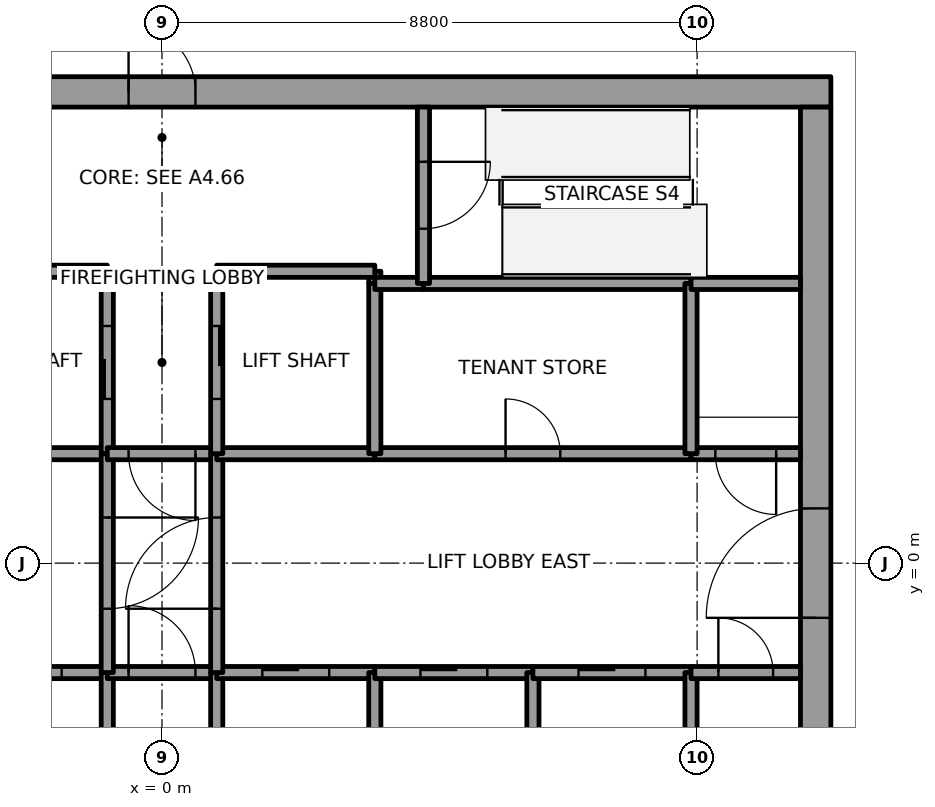
"""IFC4 building model, lengths in metres.
Left out: names, types, materials, properties, quantities, classifications, styles, units other than length and angle.
Written with IfcOpenShell. Run it as: python <this file> out.ifc"""

import sys

from ifc_helpers import new_model, si_unit, direction, frame, frame_2d, origin, place, context, subcontext, project, spatial, rectangle, extrude, element, fill, save


model = new_model("IFC4")
c1 = context("Model", 3, precision=1e-05, world=origin(), true_north=direction((0.0, 1.0)))
c2 = subcontext(c1, "Body", "Model", "MODEL_VIEW")
j1 = project(units=[si_unit("LENGTHUNIT", "METRE"), si_unit("PLANEANGLEUNIT", "RADIAN")], contexts=[c1])
p1 = place(None, origin())
s1 = spatial("IfcSite", under=j1, at=p1, CompositionType="ELEMENT")
p2 = place(p1, origin())
s2 = spatial("IfcBuilding", under=s1, at=p2, CompositionType="ELEMENT")
p3 = place(p2, frame((0.0, 0.0, 283.0)))
s3 = spatial("IfcBuildingStorey", under=s2, at=p3, CompositionType="ELEMENT", Elevation=283.0)
p4 = place(p3, frame((-11.0, 7.75, 0.0), z_axis=(0.0, 0.0, 1.0), x_axis=(1.0, 0.0, 0.0)))
e1 = element("IfcWall", 1, at=p4, inside=s3, PredefinedType="SHEAR", context=c2, shape_type="SweptSolid", body=[
    extrude(rectangle(XDim=22.0, YDim=0.5, at=frame_2d((11.0, 0.0))), origin(), (0.0, 0.0, 1.0), 4.0),
])
p5 = place(p4, frame((10.45, 0.0, 0.0)))
e2 = element("IfcOpeningElement", 2, at=p5, cuts=e1, PredefinedType="OPENING", context=c2, shape_type="SweptSolid", body=[
    extrude(rectangle(XDim=1.1, YDim=2.1, at=frame_2d((0.55, 1.05))), frame((0.0, 0.25, 0.0), z_axis=(0.0, -1.0, 0.0), x_axis=(1.0, 0.0, 0.0)), (0.0, 0.0, 1.0), 0.5),
])
p6 = place(p3, frame((10.75, -7.5, 0.0), z_axis=(0.0, 0.0, 1.0), x_axis=(0.0, 1.0, 0.0)))
e3 = element("IfcWall", 3, at=p6, inside=s3, PredefinedType="SHEAR", context=c2, shape_type="SweptSolid", body=[
    extrude(rectangle(XDim=15.0, YDim=0.5, at=frame_2d((7.5, 0.0))), origin(), (0.0, 0.0, 1.0), 4.0),
])
p7 = place(p6, frame((6.6, 0.0, 0.0)))
e4 = element("IfcOpeningElement", 4, at=p7, cuts=e3, PredefinedType="OPENING", context=c2, shape_type="SweptSolid", body=[
    extrude(rectangle(XDim=1.8, YDim=2.1, at=frame_2d((0.9, 1.05))), frame((0.0, 0.25, 0.0), z_axis=(0.0, -1.0, 0.0), x_axis=(1.0, 0.0, 0.0)), (0.0, 0.0, 1.0), 0.5),
])
p8 = place(p3, frame((-3.5, -1.8, 0.0), z_axis=(0.0, 0.0, 1.0), x_axis=(1.0, 0.0, 0.0)))
e5 = element("IfcWall", 5, at=p8, inside=s3, PredefinedType="SOLIDWALL", context=c2, shape_type="SweptSolid", body=[
    extrude(rectangle(XDim=2.6, YDim=0.2, at=frame_2d((1.3, 0.0))), origin(), (0.0, 0.0, 1.0), 3.85),
])
p9 = place(p8, frame((0.75, 0.0, 0.0)))
e6 = element("IfcOpeningElement", 6, at=p9, cuts=e5, PredefinedType="OPENING", context=c2, shape_type="SweptSolid", body=[
    extrude(rectangle(XDim=1.1, YDim=2.1, at=frame_2d((0.55, 1.05))), frame((0.0, 0.1, 0.0), z_axis=(0.0, -1.0, 0.0), x_axis=(1.0, 0.0, 0.0)), (0.0, 0.0, 1.0), 0.2),
])
p10 = place(p3, frame((-0.9, 1.8, 0.0), z_axis=(0.0, 0.0, 1.0), x_axis=(-1.0, 0.0, 0.0)))
e7 = element("IfcWall", 7, at=p10, inside=s3, PredefinedType="SOLIDWALL", context=c2, shape_type="SweptSolid", body=[
    extrude(rectangle(XDim=2.6, YDim=0.2, at=frame_2d((1.3, 0.0))), origin(), (0.0, 0.0, 1.0), 3.85),
])
p11 = place(p3, frame((-0.9, 1.8, 0.0), z_axis=(0.0, 0.0, 1.0), x_axis=(0.0, 1.0, 0.0)))
e8 = element("IfcWall", 8, at=p11, inside=s3, PredefinedType="SOLIDWALL", context=c2, shape_type="SweptSolid", body=[
    extrude(rectangle(XDim=3.0, YDim=0.2, at=frame_2d((1.5, 0.0))), origin(), (0.0, 0.0, 1.0), 3.85),
])
p12 = place(p11, frame((0.9, 0.0, 0.0)))
e9 = element("IfcOpeningElement", 9, at=p12, cuts=e8, PredefinedType="OPENING", context=c2, shape_type="SweptSolid", body=[
    extrude(rectangle(XDim=1.2, YDim=2.1, at=frame_2d((0.6, 1.05))), frame((0.0, 0.1, 0.0), z_axis=(0.0, -1.0, 0.0), x_axis=(1.0, 0.0, 0.0)), (0.0, 0.0, 1.0), 0.2),
])
p13 = place(p3, frame((-0.9, 4.8, 0.0), z_axis=(0.0, 0.0, 1.0), x_axis=(-1.0, 0.0, 0.0)))
e10 = element("IfcWall", 10, at=p13, inside=s3, PredefinedType="SOLIDWALL", context=c2, shape_type="SweptSolid", body=[
    extrude(rectangle(XDim=2.6, YDim=0.2, at=frame_2d((1.3, 0.0))), origin(), (0.0, 0.0, 1.0), 3.85),
])
p14 = place(p3, frame((-0.9, -4.6, 0.0), z_axis=(0.0, 0.0, 1.0), x_axis=(0.0, 1.0, 0.0)))
e11 = element("IfcWall", 11, at=p14, inside=s3, PredefinedType="SOLIDWALL", context=c2, shape_type="SweptSolid", body=[
    extrude(rectangle(XDim=2.8, YDim=0.2, at=frame_2d((1.4, 0.0))), origin(), (0.0, 0.0, 1.0), 3.85),
])
p15 = place(p3, frame((-0.9, -1.8, 0.0), z_axis=(0.0, 0.0, 1.0), x_axis=(1.0, 0.0, 0.0)))
e12 = element("IfcWall", 12, at=p15, inside=s3, PredefinedType="SOLIDWALL", context=c2, shape_type="SweptSolid", body=[
    extrude(rectangle(XDim=1.8, YDim=0.2, at=frame_2d((0.9, 0.0))), origin(), (0.0, 0.0, 1.0), 3.85),
])
p16 = place(p15, frame((0.35, 0.0, 0.0)))
e13 = element("IfcOpeningElement", 13, at=p16, cuts=e12, PredefinedType="OPENING", context=c2, shape_type="SweptSolid", body=[
    extrude(rectangle(XDim=1.1, YDim=2.1, at=frame_2d((0.55, 1.05))), frame((0.0, 0.1, 0.0), z_axis=(0.0, -1.0, 0.0), x_axis=(1.0, 0.0, 0.0)), (0.0, 0.0, 1.0), 0.2),
])
p17 = place(p3, frame((-0.9, 1.8, 0.0), z_axis=(0.0, 0.0, 1.0), x_axis=(0.0, -1.0, 0.0)))
e14 = element("IfcWall", 14, at=p17, inside=s3, PredefinedType="SOLIDWALL", context=c2, shape_type="SweptSolid", body=[
    extrude(rectangle(XDim=3.6, YDim=0.2, at=frame_2d((1.8, 0.0))), origin(), (0.0, 0.0, 1.0), 3.85),
])
p18 = place(p17, frame((1.05, 0.0, 0.0)))
e15 = element("IfcOpeningElement", 15, at=p18, cuts=e14, PredefinedType="OPENING", context=c2, shape_type="SweptSolid", body=[
    extrude(rectangle(XDim=1.5, YDim=2.1, at=frame_2d((0.75, 1.05))), frame((0.0, 0.1, 0.0), z_axis=(0.0, -1.0, 0.0), x_axis=(1.0, 0.0, 0.0)), (0.0, 0.0, 1.0), 0.2),
])
p19 = place(p3, frame((0.9, 1.8, 0.0), z_axis=(0.0, 0.0, 1.0), x_axis=(-1.0, 0.0, 0.0)))
e16 = element("IfcWall", 16, at=p19, inside=s3, PredefinedType="SOLIDWALL", context=c2, shape_type="SweptSolid", body=[
    extrude(rectangle(XDim=1.8, YDim=0.2, at=frame_2d((0.9, 0.0))), origin(), (0.0, 0.0, 1.0), 3.85),
])
p20 = place(p19, frame((0.35, 0.0, 0.0)))
e17 = element("IfcOpeningElement", 17, at=p20, cuts=e16, PredefinedType="OPENING", context=c2, shape_type="SweptSolid", body=[
    extrude(rectangle(XDim=1.1, YDim=2.1, at=frame_2d((0.55, 1.05))), frame((0.0, 0.1, 0.0), z_axis=(0.0, -1.0, 0.0), x_axis=(1.0, 0.0, 0.0)), (0.0, 0.0, 1.0), 0.2),
])
p21 = place(p3, frame((0.9, -1.8, 0.0), z_axis=(0.0, 0.0, 1.0), x_axis=(0.0, -1.0, 0.0)))
e18 = element("IfcWall", 18, at=p21, inside=s3, PredefinedType="SOLIDWALL", context=c2, shape_type="SweptSolid", body=[
    extrude(rectangle(XDim=2.8, YDim=0.2, at=frame_2d((1.4, 0.0))), origin(), (0.0, 0.0, 1.0), 3.85),
])
p22 = place(p3, frame((0.9, -1.8, 0.0), z_axis=(0.0, 0.0, 1.0), x_axis=(1.0, 0.0, 0.0)))
e19 = element("IfcWall", 19, at=p22, inside=s3, PredefinedType="SOLIDWALL", context=c2, shape_type="SweptSolid", body=[
    extrude(rectangle(XDim=2.6, YDim=0.2, at=frame_2d((1.3, 0.0))), origin(), (0.0, 0.0, 1.0), 3.85),
])
p23 = place(p22, frame((0.75, 0.0, 0.0)))
e20 = element("IfcOpeningElement", 20, at=p23, cuts=e19, PredefinedType="OPENING", context=c2, shape_type="SweptSolid", body=[
    extrude(rectangle(XDim=1.1, YDim=2.1, at=frame_2d((0.55, 1.05))), frame((0.0, 0.1, 0.0), z_axis=(0.0, -1.0, 0.0), x_axis=(1.0, 0.0, 0.0)), (0.0, 0.0, 1.0), 0.2),
])
p24 = place(p3, frame((0.9, -1.8, 0.0), z_axis=(0.0, 0.0, 1.0), x_axis=(0.0, 1.0, 0.0)))
e21 = element("IfcWall", 21, at=p24, inside=s3, PredefinedType="SOLIDWALL", context=c2, shape_type="SweptSolid", body=[
    extrude(rectangle(XDim=3.6, YDim=0.2, at=frame_2d((1.8, 0.0))), origin(), (0.0, 0.0, 1.0), 3.85),
])
p25 = place(p24, frame((1.05, 0.0, 0.0)))
e22 = element("IfcOpeningElement", 22, at=p25, cuts=e21, PredefinedType="OPENING", context=c2, shape_type="SweptSolid", body=[
    extrude(rectangle(XDim=1.5, YDim=2.1, at=frame_2d((0.75, 1.05))), frame((0.0, 0.1, 0.0), z_axis=(0.0, -1.0, 0.0), x_axis=(1.0, 0.0, 0.0)), (0.0, 0.0, 1.0), 0.2),
])
p26 = place(p3, frame((3.5, 1.8, 0.0), z_axis=(0.0, 0.0, 1.0), x_axis=(-1.0, 0.0, 0.0)))
e23 = element("IfcWall", 23, at=p26, inside=s3, PredefinedType="SOLIDWALL", context=c2, shape_type="SweptSolid", body=[
    extrude(rectangle(XDim=2.6, YDim=0.2, at=frame_2d((1.3, 0.0))), origin(), (0.0, 0.0, 1.0), 3.85),
])
p27 = place(p3, frame((3.5, 4.6, 0.0), z_axis=(0.0, 0.0, 1.0), x_axis=(0.0, 1.0, 0.0)))
e24 = element("IfcWall", 24, at=p27, inside=s3, PredefinedType="SOLIDWALL", context=c2, shape_type="SweptSolid", body=[
    extrude(rectangle(XDim=0.2, YDim=0.2, at=frame_2d((0.1, 0.0))), origin(), (0.0, 0.0, 1.0), 3.85),
])
p28 = place(p3, frame((3.5, 4.8, 0.0), z_axis=(0.0, 0.0, 1.0), x_axis=(-1.0, 0.0, 0.0)))
e25 = element("IfcWall", 25, at=p28, inside=s3, PredefinedType="SOLIDWALL", context=c2, shape_type="SweptSolid", body=[
    extrude(rectangle(XDim=2.6, YDim=0.2, at=frame_2d((1.3, 0.0))), origin(), (0.0, 0.0, 1.0), 3.85),
])
p29 = place(p3, frame((0.9, 4.8, 0.0), z_axis=(0.0, 0.0, 1.0), x_axis=(0.0, -1.0, 0.0)))
e26 = element("IfcWall", 26, at=p29, inside=s3, PredefinedType="SOLIDWALL", context=c2, shape_type="SweptSolid", body=[
    extrude(rectangle(XDim=3.0, YDim=0.2, at=frame_2d((1.5, 0.0))), origin(), (0.0, 0.0, 1.0), 3.85),
])
p30 = place(p29, frame((0.9, 0.0, 0.0)))
e27 = element("IfcOpeningElement", 27, at=p30, cuts=e26, PredefinedType="OPENING", context=c2, shape_type="SweptSolid", body=[
    extrude(rectangle(XDim=1.2, YDim=2.1, at=frame_2d((0.6, 1.05))), frame((0.0, 0.1, 0.0), z_axis=(0.0, -1.0, 0.0), x_axis=(1.0, 0.0, 0.0)), (0.0, 0.0, 1.0), 0.2),
])
p31 = place(p3, frame((3.5, -4.6, 0.0), z_axis=(0.0, 0.0, 1.0), x_axis=(0.0, 1.0, 0.0)))
e28 = element("IfcWall", 28, at=p31, inside=s3, PredefinedType="SOLIDWALL", context=c2, shape_type="SweptSolid", body=[
    extrude(rectangle(XDim=2.8, YDim=0.2, at=frame_2d((1.4, 0.0))), origin(), (0.0, 0.0, 1.0), 3.85),
])
p32 = place(p3, frame((3.5, -1.8, 0.0), z_axis=(0.0, 0.0, 1.0), x_axis=(1.0, 0.0, 0.0)))
e29 = element("IfcWall", 29, at=p32, inside=s3, PredefinedType="SOLIDWALL", context=c2, shape_type="SweptSolid", body=[
    extrude(rectangle(XDim=2.6, YDim=0.2, at=frame_2d((1.3, 0.0))), origin(), (0.0, 0.0, 1.0), 3.85),
])
p33 = place(p32, frame((0.75, 0.0, 0.0)))
e30 = element("IfcOpeningElement", 30, at=p33, cuts=e29, PredefinedType="OPENING", context=c2, shape_type="SweptSolid", body=[
    extrude(rectangle(XDim=1.1, YDim=2.1, at=frame_2d((0.55, 1.05))), frame((0.0, 0.1, 0.0), z_axis=(0.0, -1.0, 0.0), x_axis=(1.0, 0.0, 0.0)), (0.0, 0.0, 1.0), 0.2),
])
p34 = place(p3, frame((3.5, 1.8, 0.0), z_axis=(0.0, 0.0, 1.0), x_axis=(1.0, 0.0, 0.0)))
e31 = element("IfcWall", 31, at=p34, inside=s3, PredefinedType="SOLIDWALL", context=c2, shape_type="SweptSolid", body=[
    extrude(rectangle(XDim=5.2, YDim=0.2, at=frame_2d((2.6, 0.0))), origin(), (0.0, 0.0, 1.0), 3.85),
])
p35 = place(p34, frame((2.15, 0.0, 0.0)))
e32 = element("IfcOpeningElement", 32, at=p35, cuts=e31, PredefinedType="OPENING", context=c2, shape_type="SweptSolid", body=[
    extrude(rectangle(XDim=0.9, YDim=2.1, at=frame_2d((0.45, 1.05))), frame((0.0, 0.1, 0.0), z_axis=(0.0, -1.0, 0.0), x_axis=(1.0, 0.0, 0.0)), (0.0, 0.0, 1.0), 0.2),
])
p36 = place(p3, frame((3.5, 4.6, 0.0), z_axis=(0.0, 0.0, 1.0), x_axis=(0.0, -1.0, 0.0)))
e33 = element("IfcWall", 33, at=p36, inside=s3, PredefinedType="SOLIDWALL", context=c2, shape_type="SweptSolid", body=[
    extrude(rectangle(XDim=2.8, YDim=0.2, at=frame_2d((1.4, 0.0))), origin(), (0.0, 0.0, 1.0), 3.85),
])
p37 = place(p3, frame((4.3, 4.6, 0.0), z_axis=(0.0, 0.0, 1.0), x_axis=(-1.0, 0.0, 0.0)))
e34 = element("IfcWall", 34, at=p37, inside=s3, PredefinedType="SOLIDWALL", context=c2, shape_type="SweptSolid", body=[
    extrude(rectangle(XDim=0.8, YDim=0.2, at=frame_2d((0.4, 0.0))), origin(), (0.0, 0.0, 1.0), 3.85),
])
p38 = place(p3, frame((8.7, 4.6, 0.0), z_axis=(0.0, 0.0, 1.0), x_axis=(-1.0, 0.0, 0.0)))
e35 = element("IfcWall", 35, at=p38, inside=s3, PredefinedType="SOLIDWALL", context=c2, shape_type="SweptSolid", body=[
    extrude(rectangle(XDim=4.4, YDim=0.2, at=frame_2d((2.2, 0.0))), origin(), (0.0, 0.0, 1.0), 3.85),
])
p39 = place(p3, frame((4.3, 7.5, 0.0), z_axis=(0.0, 0.0, 1.0), x_axis=(0.0, -1.0, 0.0)))
e36 = element("IfcWall", 36, at=p39, inside=s3, PredefinedType="SOLIDWALL", context=c2, shape_type="SweptSolid", body=[
    extrude(rectangle(XDim=2.9, YDim=0.2, at=frame_2d((1.45, 0.0))), origin(), (0.0, 0.0, 1.0), 3.85),
])
p40 = place(p39, frame((0.9, 0.0, 0.0)))
e37 = element("IfcOpeningElement", 37, at=p40, cuts=e36, PredefinedType="OPENING", context=c2, shape_type="SweptSolid", body=[
    extrude(rectangle(XDim=1.1, YDim=2.1, at=frame_2d((0.55, 1.05))), frame((0.0, 0.1, 0.0), z_axis=(0.0, -1.0, 0.0), x_axis=(1.0, 0.0, 0.0)), (0.0, 0.0, 1.0), 0.2),
])
p41 = place(p3, frame((6.1, -4.6, 0.0), z_axis=(0.0, 0.0, 1.0), x_axis=(0.0, 1.0, 0.0)))
e38 = element("IfcWall", 38, at=p41, inside=s3, PredefinedType="SOLIDWALL", context=c2, shape_type="SweptSolid", body=[
    extrude(rectangle(XDim=2.8, YDim=0.2, at=frame_2d((1.4, 0.0))), origin(), (0.0, 0.0, 1.0), 3.85),
])
p42 = place(p3, frame((6.1, -1.8, 0.0), z_axis=(0.0, 0.0, 1.0), x_axis=(1.0, 0.0, 0.0)))
e39 = element("IfcWall", 39, at=p42, inside=s3, PredefinedType="SOLIDWALL", context=c2, shape_type="SweptSolid", body=[
    extrude(rectangle(XDim=2.6, YDim=0.2, at=frame_2d((1.3, 0.0))), origin(), (0.0, 0.0, 1.0), 3.85),
])
p43 = place(p42, frame((0.75, 0.0, 0.0)))
e40 = element("IfcOpeningElement", 40, at=p43, cuts=e39, PredefinedType="OPENING", context=c2, shape_type="SweptSolid", body=[
    extrude(rectangle(XDim=1.1, YDim=2.1, at=frame_2d((0.55, 1.05))), frame((0.0, 0.1, 0.0), z_axis=(0.0, -1.0, 0.0), x_axis=(1.0, 0.0, 0.0)), (0.0, 0.0, 1.0), 0.2),
])
p44 = place(p3, frame((8.7, -1.8, 0.0), z_axis=(0.0, 0.0, 1.0), x_axis=(0.0, -1.0, 0.0)))
e41 = element("IfcWall", 41, at=p44, inside=s3, PredefinedType="SOLIDWALL", context=c2, shape_type="SweptSolid", body=[
    extrude(rectangle(XDim=2.8, YDim=0.2, at=frame_2d((1.4, 0.0))), origin(), (0.0, 0.0, 1.0), 3.85),
])
p45 = place(p3, frame((8.7, -1.8, 0.0), z_axis=(0.0, 0.0, 1.0), x_axis=(1.0, 0.0, 0.0)))
e42 = element("IfcWall", 42, at=p45, inside=s3, PredefinedType="SOLIDWALL", context=c2, shape_type="SweptSolid", body=[
    extrude(rectangle(XDim=1.8, YDim=0.2, at=frame_2d((0.9, 0.0))), origin(), (0.0, 0.0, 1.0), 3.85),
])
p46 = place(p45, frame((0.45, 0.0, 0.0)))
e43 = element("IfcOpeningElement", 43, at=p46, cuts=e42, PredefinedType="OPENING", context=c2, shape_type="SweptSolid", body=[
    extrude(rectangle(XDim=0.9, YDim=2.1, at=frame_2d((0.45, 1.05))), frame((0.0, 0.1, 0.0), z_axis=(0.0, -1.0, 0.0), x_axis=(1.0, 0.0, 0.0)), (0.0, 0.0, 1.0), 0.2),
])
p47 = place(p3, frame((10.5, 1.8, 0.0), z_axis=(0.0, 0.0, 1.0), x_axis=(-1.0, 0.0, 0.0)))
e44 = element("IfcWall", 44, at=p47, inside=s3, PredefinedType="SOLIDWALL", context=c2, shape_type="SweptSolid", body=[
    extrude(rectangle(XDim=1.8, YDim=0.2, at=frame_2d((0.9, 0.0))), origin(), (0.0, 0.0, 1.0), 3.85),
])
p48 = place(p47, frame((0.4, 0.0, 0.0)))
e45 = element("IfcOpeningElement", 45, at=p48, cuts=e44, PredefinedType="OPENING", context=c2, shape_type="SweptSolid", body=[
    extrude(rectangle(XDim=1.0, YDim=2.1, at=frame_2d((0.5, 1.05))), frame((0.0, 0.1, 0.0), z_axis=(0.0, -1.0, 0.0), x_axis=(1.0, 0.0, 0.0)), (0.0, 0.0, 1.0), 0.2),
])
p49 = place(p3, frame((8.7, 1.8, 0.0), z_axis=(0.0, 0.0, 1.0), x_axis=(0.0, 1.0, 0.0)))
e46 = element("IfcWall", 46, at=p49, inside=s3, PredefinedType="SOLIDWALL", context=c2, shape_type="SweptSolid", body=[
    extrude(rectangle(XDim=2.8, YDim=0.2, at=frame_2d((1.4, 0.0))), origin(), (0.0, 0.0, 1.0), 3.85),
])
p50 = place(p3, frame((10.5, 4.6, 0.0), z_axis=(0.0, 0.0, 1.0), x_axis=(-1.0, 0.0, 0.0)))
e47 = element("IfcWall", 47, at=p50, inside=s3, PredefinedType="SOLIDWALL", context=c2, shape_type="SweptSolid", body=[
    extrude(rectangle(XDim=1.8, YDim=0.2, at=frame_2d((0.9, 0.0))), origin(), (0.0, 0.0, 1.0), 3.85),
])
p51 = place(p9, origin())
e48 = element("IfcDoor", 48, at=p51, inside=s3, OperationType="SLIDING_TO_LEFT", PredefinedType="DOOR", context=c2, shape_type="SweptSolid", body=[
    extrude(rectangle(XDim=1.1, YDim=2.1, at=frame_2d((0.55, 1.05))), frame((0.0, 0.025, 0.0), z_axis=(0.0, -1.0, 0.0), x_axis=(1.0, 0.0, 0.0)), (0.0, 0.0, 1.0), 0.05),
])
fill(e6, e48)
p52 = place(p23, origin())
e49 = element("IfcDoor", 49, at=p52, inside=s3, OperationType="SLIDING_TO_LEFT", PredefinedType="DOOR", context=c2, shape_type="SweptSolid", body=[
    extrude(rectangle(XDim=1.1, YDim=2.1, at=frame_2d((0.55, 1.05))), frame((0.0, 0.025, 0.0), z_axis=(0.0, -1.0, 0.0), x_axis=(1.0, 0.0, 0.0)), (0.0, 0.0, 1.0), 0.05),
])
fill(e20, e49)
p53 = place(p33, origin())
e50 = element("IfcDoor", 50, at=p53, inside=s3, OperationType="SLIDING_TO_RIGHT", PredefinedType="DOOR", context=c2, shape_type="SweptSolid", body=[
    extrude(rectangle(XDim=1.1, YDim=2.1, at=frame_2d((0.55, 1.05))), frame((0.0, 0.025, 0.0), z_axis=(0.0, -1.0, 0.0), x_axis=(1.0, 0.0, 0.0)), (0.0, 0.0, 1.0), 0.05),
])
fill(e30, e50)
p54 = place(p43, origin())
e51 = element("IfcDoor", 51, at=p54, inside=s3, OperationType="SLIDING_TO_RIGHT", PredefinedType="DOOR", context=c2, shape_type="SweptSolid", body=[
    extrude(rectangle(XDim=1.1, YDim=2.1, at=frame_2d((0.55, 1.05))), frame((0.0, 0.025, 0.0), z_axis=(0.0, -1.0, 0.0), x_axis=(1.0, 0.0, 0.0)), (0.0, 0.0, 1.0), 0.05),
])
fill(e40, e51)
p55 = place(p12, origin())
e52 = element("IfcDoor", 52, at=p55, inside=s3, OperationType="SLIDING_TO_LEFT", PredefinedType="DOOR", context=c2, shape_type="SweptSolid", body=[
    extrude(rectangle(XDim=1.2, YDim=2.1, at=frame_2d((0.6, 1.05))), frame((0.0, 0.025, 0.0), z_axis=(0.0, -1.0, 0.0), x_axis=(1.0, 0.0, 0.0)), (0.0, 0.0, 1.0), 0.05),
])
fill(e9, e52)
p56 = place(p30, origin())
e53 = element("IfcDoor", 53, at=p56, inside=s3, OperationType="SLIDING_TO_RIGHT", PredefinedType="DOOR", context=c2, shape_type="SweptSolid", body=[
    extrude(rectangle(XDim=1.2, YDim=2.1, at=frame_2d((0.6, 1.05))), frame((0.0, 0.025, 0.0), z_axis=(0.0, -1.0, 0.0), x_axis=(1.0, 0.0, 0.0)), (0.0, 0.0, 1.0), 0.05),
])
fill(e27, e53)
p57 = place(p18, origin())
e54 = element("IfcDoor", 54, at=p57, inside=s3, OperationType="DOUBLE_DOOR_SINGLE_SWING", PredefinedType="DOOR", context=c2, shape_type="SweptSolid", body=[
    extrude(rectangle(XDim=1.5, YDim=2.1, at=frame_2d((0.75, 1.05))), frame((0.0, 0.025, 0.0), z_axis=(0.0, -1.0, 0.0), x_axis=(1.0, 0.0, 0.0)), (0.0, 0.0, 1.0), 0.05),
])
fill(e15, e54)
p58 = place(p25, origin())
e55 = element("IfcDoor", 55, at=p58, inside=s3, OperationType="DOUBLE_DOOR_SINGLE_SWING", PredefinedType="DOOR", context=c2, shape_type="SweptSolid", body=[
    extrude(rectangle(XDim=1.5, YDim=2.1, at=frame_2d((0.75, 1.05))), frame((0.0, 0.025, 0.0), z_axis=(0.0, -1.0, 0.0), x_axis=(1.0, 0.0, 0.0)), (0.0, 0.0, 1.0), 0.05),
])
fill(e22, e55)
p59 = place(p20, origin())
e56 = element("IfcDoor", 56, at=p59, inside=s3, OperationType="SINGLE_SWING_LEFT", PredefinedType="DOOR", context=c2, shape_type="SweptSolid", body=[
    extrude(rectangle(XDim=1.1, YDim=2.1, at=frame_2d((0.55, 1.05))), frame((0.0, 0.025, 0.0), z_axis=(0.0, -1.0, 0.0), x_axis=(1.0, 0.0, 0.0)), (0.0, 0.0, 1.0), 0.05),
])
fill(e17, e56)
p60 = place(p16, origin())
e57 = element("IfcDoor", 57, at=p60, inside=s3, OperationType="SINGLE_SWING_RIGHT", PredefinedType="DOOR", context=c2, shape_type="SweptSolid", body=[
    extrude(rectangle(XDim=1.1, YDim=2.1, at=frame_2d((0.55, 1.05))), frame((0.0, 0.025, 0.0), z_axis=(0.0, -1.0, 0.0), x_axis=(1.0, 0.0, 0.0)), (0.0, 0.0, 1.0), 0.05),
])
fill(e13, e57)
p61 = place(p48, origin())
e58 = element("IfcDoor", 58, at=p61, inside=s3, OperationType="SINGLE_SWING_LEFT", PredefinedType="DOOR", context=c2, shape_type="SweptSolid", body=[
    extrude(rectangle(XDim=1.0, YDim=2.1, at=frame_2d((0.5, 1.05))), frame((0.0, 0.025, 0.0), z_axis=(0.0, -1.0, 0.0), x_axis=(1.0, 0.0, 0.0)), (0.0, 0.0, 1.0), 0.05),
])
fill(e45, e58)
p62 = place(p40, origin())
e59 = element("IfcDoor", 59, at=p62, inside=s3, OperationType="SINGLE_SWING_LEFT", PredefinedType="DOOR", context=c2, shape_type="SweptSolid", body=[
    extrude(rectangle(XDim=1.1, YDim=2.1, at=frame_2d((0.55, 1.05))), frame((0.0, 0.025, 0.0), z_axis=(0.0, -1.0, 0.0), x_axis=(1.0, 0.0, 0.0)), (0.0, 0.0, 1.0), 0.05),
])
fill(e37, e59)
p63 = place(p35, origin())
e60 = element("IfcDoor", 60, at=p63, inside=s3, OperationType="SINGLE_SWING_RIGHT", PredefinedType="DOOR", context=c2, shape_type="SweptSolid", body=[
    extrude(rectangle(XDim=0.9, YDim=2.1, at=frame_2d((0.45, 1.05))), frame((0.0, 0.025, 0.0), z_axis=(0.0, -1.0, 0.0), x_axis=(1.0, 0.0, 0.0)), (0.0, 0.0, 1.0), 0.05),
])
fill(e32, e60)
p64 = place(p46, origin())
e61 = element("IfcDoor", 61, at=p64, inside=s3, OperationType="SINGLE_SWING_LEFT", PredefinedType="DOOR", context=c2, shape_type="SweptSolid", body=[
    extrude(rectangle(XDim=0.9, YDim=2.1, at=frame_2d((0.45, 1.05))), frame((0.0, 0.025, 0.0), z_axis=(0.0, -1.0, 0.0), x_axis=(1.0, 0.0, 0.0)), (0.0, 0.0, 1.0), 0.05),
])
fill(e43, e61)
p65 = place(p7, origin())
e62 = element("IfcDoor", 62, at=p65, inside=s3, OperationType="DOUBLE_DOOR_SINGLE_SWING", PredefinedType="DOOR", context=c2, shape_type="SweptSolid", body=[
    extrude(rectangle(XDim=1.8, YDim=2.1, at=frame_2d((0.9, 1.05))), frame((0.0, 0.025, 0.0), z_axis=(0.0, -1.0, 0.0), x_axis=(1.0, 0.0, 0.0)), (0.0, 0.0, 1.0), 0.05),
])
fill(e4, e62)
p66 = place(p5, origin())
e63 = element("IfcDoor", 63, at=p66, inside=s3, OperationType="SINGLE_SWING_LEFT", PredefinedType="DOOR", context=c2, shape_type="SweptSolid", body=[
    extrude(rectangle(XDim=1.1, YDim=2.1, at=frame_2d((0.55, 1.05))), frame((0.0, 0.025, 0.0), z_axis=(0.0, -1.0, 0.0), x_axis=(1.0, 0.0, 0.0)), (0.0, 0.0, 1.0), 0.05),
])
fill(e2, e63)
save(model, sys.argv[1])
